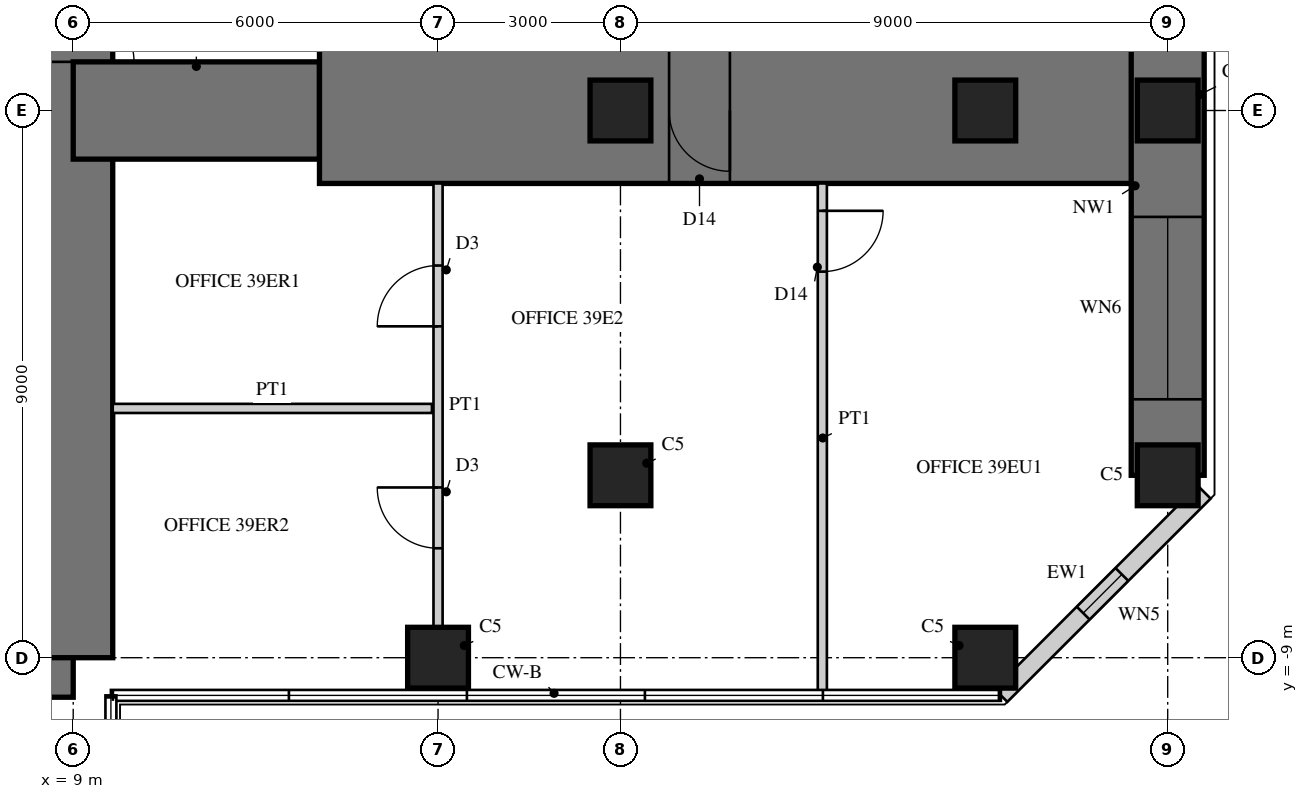
"""IFC4 building model, lengths in metres.
Left out: names, types, materials, properties, quantities, classifications, styles, units other than length and angle.
Written with IfcOpenShell. Run it as: python <this file> out.ifc"""

import sys

from ifc_helpers import new_model, si_unit, direction, frame, frame_2d, origin, origin_2d, place, context, subcontext, project, spatial, rectangle, hollow_rectangle, extrude, element, fill, save


model = new_model("IFC4")
c1 = context("Model", 3, precision=1e-05, world=origin(), true_north=direction((0.0, 1.0)))
c2 = subcontext(c1, "Body", "Model", "MODEL_VIEW")
j1 = project(units=[si_unit("LENGTHUNIT", "METRE"), si_unit("PLANEANGLEUNIT", "RADIAN")], contexts=[c1])
p1 = place(None, origin())
s1 = spatial("IfcSite", under=j1, at=p1, CompositionType="ELEMENT")
p2 = place(p1, origin())
s2 = spatial("IfcBuilding", under=s1, at=p2, CompositionType="ELEMENT")
p3 = place(p2, frame((0.0, 0.0, 160.5)))
s3 = spatial("IfcBuildingStorey", under=s2, at=p3, CompositionType="ELEMENT", Elevation=160.5)
p4 = place(p3, frame((-9.0, -9.0, 0.0), z_axis=(0.0, 0.0, 1.0), x_axis=(1.0, 0.0, 0.0)))
e1 = element("IfcWall", 1, at=p4, inside=s3, PredefinedType="SHEAR", context=c2, shape_type="SweptSolid", body=[
    extrude(rectangle(XDim=18.0, YDim=1.3, at=frame_2d((9.0, 0.0))), origin(), (0.0, 0.0, 1.0), 4.0),
])
p5 = place(p4, frame((9.8, 0.0, 0.0)))
e2 = element("IfcOpeningElement", 2, at=p5, cuts=e1, PredefinedType="OPENING", context=c2, shape_type="SweptSolid", body=[
    extrude(rectangle(XDim=1.0, YDim=2.4, at=frame_2d((0.5, 1.2))), frame((0.0, 0.66, 0.0), z_axis=(0.0, -1.0, 0.0), x_axis=(1.0, 0.0, 0.0)), (0.0, 0.0, 1.0), 1.32),
])
p6 = place(p3, frame((9.0, -9.0, 0.0), z_axis=(0.0, 0.0, 1.0), x_axis=(0.0, 1.0, 0.0)))
e3 = element("IfcWall", 3, at=p6, inside=s3, PredefinedType="SHEAR", context=c2, shape_type="SweptSolid", body=[
    extrude(rectangle(XDim=18.0, YDim=1.3, at=frame_2d((9.0, 0.0))), origin(), (0.0, 0.0, 1.0), 4.0),
])
p7 = place(p6, frame((9.8, 0.0, 0.0)))
e4 = element("IfcOpeningElement", 4, at=p7, cuts=e3, PredefinedType="OPENING", context=c2, shape_type="SweptSolid", body=[
    extrude(rectangle(XDim=1.0, YDim=2.4, at=frame_2d((0.5, 1.2))), frame((0.0, 0.66, 0.0), z_axis=(0.0, -1.0, 0.0), x_axis=(1.0, 0.0, 0.0)), (0.0, 0.0, 1.0), 1.32),
])
p8 = place(p3, frame((9.0, 0.0, 0.0), z_axis=(0.0, 0.0, 1.0), x_axis=(1.0, 0.0, 0.0)))
e5 = element("IfcWall", 5, at=p8, inside=s3, PredefinedType="SHEAR", context=c2, shape_type="SweptSolid", body=[
    extrude(rectangle(XDim=4.05, YDim=1.6, at=frame_2d((2.025, 0.0))), origin(), (0.0, 0.0, 1.0), 4.0),
])
p9 = place(p3, frame((13.05, 0.0, 0.0), z_axis=(0.0, 0.0, 1.0), x_axis=(1.0, 0.0, 0.0)))
e6 = element("IfcWall", 6, at=p9, inside=s3, PredefinedType="SHEAR", context=c2, shape_type="SweptSolid", body=[
    extrude(rectangle(XDim=13.95, YDim=2.4, at=frame_2d((6.975, 0.0))), origin(), (0.0, 0.0, 1.0), 4.0),
])
p10 = place(p9, frame((5.75, 0.0, 0.0)))
e7 = element("IfcOpeningElement", 7, at=p10, cuts=e6, PredefinedType="OPENING", context=c2, shape_type="SweptSolid", body=[
    extrude(rectangle(XDim=1.0, YDim=2.2, at=frame_2d((0.5, 1.1))), frame((0.0, 1.21, 0.0), z_axis=(0.0, -1.0, 0.0), x_axis=(1.0, 0.0, 0.0)), (0.0, 0.0, 1.0), 2.42),
])
p11 = place(p3, frame((27.0, -6.0, 0.0), z_axis=(0.0, 0.0, 1.0), x_axis=(0.0, 1.0, 0.0)))
e8 = element("IfcWall", 8, at=p11, inside=s3, PredefinedType="SHEAR", context=c2, shape_type="SweptSolid", body=[
    extrude(rectangle(XDim=12.0, YDim=1.2, at=frame_2d((6.0, 0.0))), origin(), (0.0, 0.0, 1.0), 4.0),
])
p12 = place(p11, frame((1.25, 0.0, 0.6)))
e9 = element("IfcOpeningElement", 9, at=p12, cuts=e8, PredefinedType="OPENING", context=c2, shape_type="SweptSolid", body=[
    extrude(rectangle(XDim=3.0, YDim=2.4, at=frame_2d((1.5, 1.2))), frame((0.0, 0.61, 0.0), z_axis=(0.0, -1.0, 0.0), x_axis=(1.0, 0.0, 0.0)), (0.0, 0.0, 1.0), 1.22),
])
p13 = place(p11, frame((7.75, 0.0, 0.6)))
e10 = element("IfcOpeningElement", 10, at=p13, cuts=e8, PredefinedType="OPENING", context=c2, shape_type="SweptSolid", body=[
    extrude(rectangle(XDim=3.0, YDim=2.4, at=frame_2d((1.5, 1.2))), frame((0.0, 0.61, 0.0), z_axis=(0.0, -1.0, 0.0), x_axis=(1.0, 0.0, 0.0)), (0.0, 0.0, 1.0), 1.22),
])
for number, where, z_axis, x_axis in (
    (11, (15.0, -9.0, 0.0), (0.0, 0.0, 1.0), (1.0, 0.0, 0.0)),
    (12, (24.0, -9.0, 0.0), (0.0, 0.0, 1.0), (1.0, 0.0, 0.0)),
    (13, (27.0, -6.0, 0.0), (0.0, 0.0, 1.0), (1.0, 0.0, 0.0)),
    (14, (27.0, 0.0, 0.0), (0.0, 0.0, 1.0), (1.0, 0.0, 0.0)),
    (15, (18.0, -6.0, 0.0), (0.0, 0.0, 1.0), (1.0, 0.0, 0.0)),
    (16, (18.0, 0.0, 0.0), (0.0, 0.0, 1.0), (1.0, 0.0, 0.0)),
    (17, (24.0, 0.0, 0.0), (0.0, 0.0, 1.0), (1.0, 0.0, 0.0)),
):
    element("IfcColumn", number, at=place(p3, frame(where, z_axis=z_axis, x_axis=x_axis)), inside=s3, PredefinedType="COLUMN", context=c2, shape_type="SweptSolid", body=[
        extrude(rectangle(XDim=1.0, YDim=1.0, at=origin_2d()), origin(), (0.0, 0.0, 1.0), 4.0),
    ])
p14 = place(p3, frame((24.257, -9.62, 0.0), z_axis=(0.0, 0.0, 1.0), x_axis=(0.707106781187, 0.707106781187, 0.0)))
e18 = element("IfcWall", 18, at=p14, inside=s3, PredefinedType="SOLIDWALL", context=c2, shape_type="SweptSolid", body=[
    extrude(rectangle(XDim=4.728, YDim=0.3, at=frame_2d((2.364, 0.0))), origin(), (0.0, 0.0, 1.0), 3.75),
])
p15 = place(p14, frame((1.914, 0.0, 0.3)))
e19 = element("IfcOpeningElement", 19, at=p15, cuts=e18, PredefinedType="OPENING", context=c2, shape_type="SweptSolid", body=[
    extrude(rectangle(XDim=0.9, YDim=2.4, at=frame_2d((0.45, 1.2))), frame((0.0, 0.16, 0.0), z_axis=(0.0, -1.0, 0.0), x_axis=(1.0, 0.0, 0.0)), (0.0, 0.0, 1.0), 0.32),
])
p16 = place(p3, frame((15.0, -8.5, 0.0), z_axis=(0.0, 0.0, 1.0), x_axis=(0.0, 1.0, 0.0)))
e20 = element("IfcWall", 20, at=p16, inside=s3, PredefinedType="PARTITIONING", context=c2, shape_type="SweptSolid", body=[
    extrude(rectangle(XDim=7.3, YDim=0.15, at=frame_2d((3.65, 0.0))), origin(), (0.0, 0.0, 1.0), 2.7),
])
p17 = place(p16, frame((1.3, 0.0, 0.0)))
e21 = element("IfcOpeningElement", 21, at=p17, cuts=e20, PredefinedType="OPENING", context=c2, shape_type="SweptSolid", body=[
    extrude(rectangle(XDim=1.0, YDim=2.1, at=frame_2d((0.5, 1.05))), frame((0.0, 0.085, 0.0), z_axis=(0.0, -1.0, 0.0), x_axis=(1.0, 0.0, 0.0)), (0.0, 0.0, 1.0), 0.17),
])
p18 = place(p16, frame((4.95, 0.0, 0.0)))
e22 = element("IfcOpeningElement", 22, at=p18, cuts=e20, PredefinedType="OPENING", context=c2, shape_type="SweptSolid", body=[
    extrude(rectangle(XDim=1.0, YDim=2.1, at=frame_2d((0.5, 1.05))), frame((0.0, 0.085, 0.0), z_axis=(0.0, -1.0, 0.0), x_axis=(1.0, 0.0, 0.0)), (0.0, 0.0, 1.0), 0.17),
])
p19 = place(p3, frame((9.65, -4.9, 0.0), z_axis=(0.0, 0.0, 1.0), x_axis=(1.0, 0.0, 0.0)))
e23 = element("IfcWall", 23, at=p19, inside=s3, PredefinedType="PARTITIONING", context=c2, shape_type="SweptSolid", body=[
    extrude(rectangle(XDim=5.25, YDim=0.15, at=frame_2d((2.625, 0.0))), origin(), (0.0, 0.0, 1.0), 3.75),
])
p20 = place(p3, frame((21.32, -9.58, 0.0), z_axis=(0.0, 0.0, 1.0), x_axis=(0.0, 1.0, 0.0)))
e24 = element("IfcWall", 24, at=p20, inside=s3, PredefinedType="PARTITIONING", context=c2, shape_type="SweptSolid", body=[
    extrude(rectangle(XDim=8.38, YDim=0.15, at=frame_2d((4.19, 0.0))), origin(), (0.0, 0.0, 1.0), 3.75),
])
p21 = place(p20, frame((6.93, 0.0, 0.0)))
e25 = element("IfcOpeningElement", 25, at=p21, cuts=e24, PredefinedType="OPENING", context=c2, shape_type="SweptSolid", body=[
    extrude(rectangle(XDim=1.0, YDim=2.2, at=frame_2d((0.5, 1.1))), frame((0.0, 0.085, 0.0), z_axis=(0.0, -1.0, 0.0), x_axis=(1.0, 0.0, 0.0)), (0.0, 0.0, 1.0), 0.17),
])
p22 = place(p15, origin())
e26 = element("IfcWindow", 26, at=p22, inside=s3, PartitioningType="SINGLE_PANEL", PredefinedType="WINDOW", context=c2, shape_type="SweptSolid", body=[
    extrude(hollow_rectangle(XDim=0.9, YDim=2.4, WallThickness=0.06, at=frame_2d((0.45, 1.2))), frame((0.0, 0.03, 0.0), z_axis=(0.0, -1.0, 0.0), x_axis=(1.0, 0.0, 0.0)), (0.0, 0.0, 1.0), 0.06),
    extrude(rectangle(XDim=0.779, YDim=2.279, at=frame_2d((0.45, 1.2))), frame((0.0, 0.03, 0.0), z_axis=(0.0, -1.0, 0.0), x_axis=(1.0, 0.0, 0.0)), (0.0, 0.0, 1.0), 0.06),
])
fill(e19, e26)
p23 = place(p12, origin())
e27 = element("IfcWindow", 27, at=p23, inside=s3, PartitioningType="SINGLE_PANEL", PredefinedType="WINDOW", context=c2, shape_type="SweptSolid", body=[
    extrude(hollow_rectangle(XDim=3.0, YDim=2.4, WallThickness=0.06, at=frame_2d((1.5, 1.2))), frame((0.0, 0.03, 0.0), z_axis=(0.0, -1.0, 0.0), x_axis=(1.0, 0.0, 0.0)), (0.0, 0.0, 1.0), 0.06),
    extrude(rectangle(XDim=2.879, YDim=2.279, at=frame_2d((1.5, 1.2))), frame((0.0, 0.03, 0.0), z_axis=(0.0, -1.0, 0.0), x_axis=(1.0, 0.0, 0.0)), (0.0, 0.0, 1.0), 0.06),
])
fill(e9, e27)
p24 = place(p17, origin())
e28 = element("IfcDoor", 28, at=p24, inside=s3, OperationType="SINGLE_SWING_RIGHT", PredefinedType="DOOR", context=c2, shape_type="SweptSolid", body=[
    extrude(rectangle(XDim=1.0, YDim=2.1, at=frame_2d((0.5, 1.05))), frame((0.0, 0.025, 0.0), z_axis=(0.0, -1.0, 0.0), x_axis=(1.0, 0.0, 0.0)), (0.0, 0.0, 1.0), 0.05),
])
fill(e21, e28)
p25 = place(p18, origin())
e29 = element("IfcDoor", 29, at=p25, inside=s3, OperationType="SINGLE_SWING_LEFT", PredefinedType="DOOR", context=c2, shape_type="SweptSolid", body=[
    extrude(rectangle(XDim=1.0, YDim=2.1, at=frame_2d((0.5, 1.05))), frame((0.0, 0.025, 0.0), z_axis=(0.0, -1.0, 0.0), x_axis=(1.0, 0.0, 0.0)), (0.0, 0.0, 1.0), 0.05),
])
fill(e22, e29)
p26 = place(p21, frame((1.0, 0.0, 0.0), z_axis=(0.0, 0.0, 1.0), x_axis=(-1.0, 0.0, 0.0)))
e30 = element("IfcDoor", 30, at=p26, inside=s3, OperationType="SINGLE_SWING_LEFT", PredefinedType="DOOR", context=c2, shape_type="SweptSolid", body=[
    extrude(rectangle(XDim=1.0, YDim=2.2, at=frame_2d((0.5, 1.1))), frame((0.0, 0.025, 0.0), z_axis=(0.0, -1.0, 0.0), x_axis=(1.0, 0.0, 0.0)), (0.0, 0.0, 1.0), 0.05),
])
fill(e25, e30)
p27 = place(p10, frame((1.0, 0.0, 0.0), z_axis=(0.0, 0.0, 1.0), x_axis=(-1.0, 0.0, 0.0)))
e31 = element("IfcDoor", 31, at=p27, inside=s3, OperationType="SINGLE_SWING_LEFT", PredefinedType="DOOR", context=c2, shape_type="SweptSolid", body=[
    extrude(rectangle(XDim=1.0, YDim=2.2, at=frame_2d((0.5, 1.1))), frame((0.0, 0.025, 0.0), z_axis=(0.0, -1.0, 0.0), x_axis=(1.0, 0.0, 0.0)), (0.0, 0.0, 1.0), 0.05),
])
fill(e7, e31)
p28 = place(p7, frame((1.0, 0.0, 0.0), z_axis=(0.0, 0.0, 1.0), x_axis=(-1.0, 0.0, 0.0)))
e32 = element("IfcDoor", 32, at=p28, inside=s3, OperationType="SINGLE_SWING_RIGHT", PredefinedType="DOOR", context=c2, shape_type="SweptSolid", body=[
    extrude(rectangle(XDim=1.0, YDim=2.4, at=frame_2d((0.5, 1.2))), frame((0.0, -0.005, 0.0), z_axis=(0.0, -1.0, 0.0), x_axis=(1.0, 0.0, 0.0)), (0.0, 0.0, 1.0), 0.05),
])
fill(e4, e32)
save(model, sys.argv[1])
